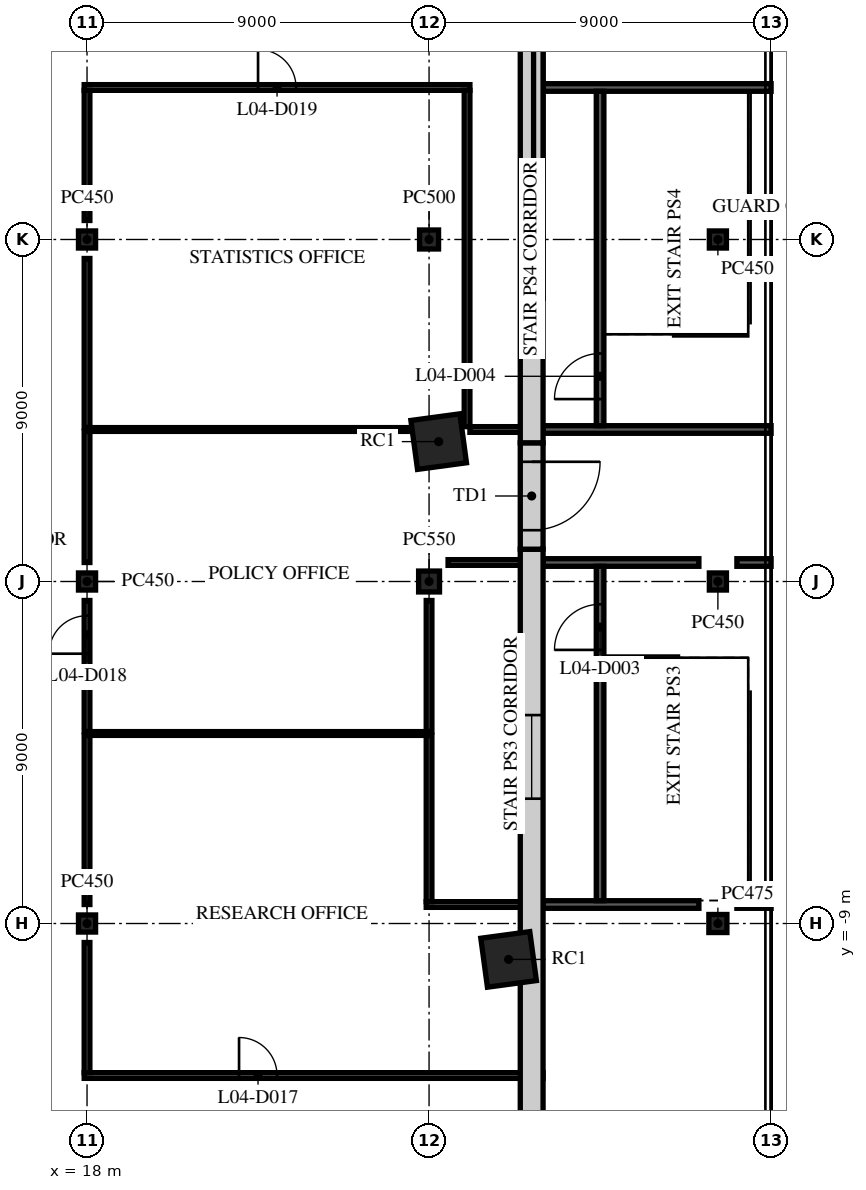
"""IFC4 building model, lengths in metres.
Left out: names, types, materials, properties, quantities, classifications, styles, units other than length and angle.
Written with IfcOpenShell. Run it as: python <this file> out.ifc"""

import sys

from ifc_helpers import new_model, si_unit, direction, frame, frame_2d, origin, origin_2d, place, context, subcontext, project, spatial, rectangle, extrude, element, fill, save


model = new_model("IFC4")
c1 = context("Model", 3, precision=1e-05, world=origin(), true_north=direction((0.0, 1.0)))
c2 = subcontext(c1, "Body", "Model", "MODEL_VIEW")
j1 = project(units=[si_unit("LENGTHUNIT", "METRE"), si_unit("PLANEANGLEUNIT", "RADIAN")], contexts=[c1])
p1 = place(None, origin())
s1 = spatial("IfcSite", under=j1, at=p1, CompositionType="ELEMENT")
p2 = place(p1, origin())
s2 = spatial("IfcBuilding", under=s1, at=p2, CompositionType="ELEMENT")
p3 = place(p2, frame((0.0, 0.0, 18.0)))
s3 = spatial("IfcBuildingStorey", under=s2, at=p3, CompositionType="ELEMENT", Elevation=18.0)
for number, where, z_axis, x_axis in (
    (1, (18.0, -9.0, 0.0), (0.0, 0.0, 1.0), (1.0, 0.0, 0.0)),
    (2, (18.0, 0.0, 0.0), (0.0, 0.0, 1.0), (1.0, 0.0, 0.0)),
    (3, (18.0, 9.0, 0.0), (0.0, 0.0, 1.0), (1.0, 0.0, 0.0)),
):
    element("IfcColumn", number, at=place(p3, frame(where, z_axis=z_axis, x_axis=x_axis)), inside=s3, PredefinedType="COLUMN", context=c2, shape_type="SweptSolid", body=[
        extrude(rectangle(XDim=0.45, YDim=0.45, at=origin_2d()), origin(), (0.0, 0.0, 1.0), 4.5),
    ])
p4 = place(p3, frame((27.0, 0.0, 0.0), z_axis=(0.0, 0.0, 1.0), x_axis=(1.0, 0.0, 0.0)))
e4 = element("IfcColumn", 4, at=p4, inside=s3, PredefinedType="COLUMN", context=c2, shape_type="SweptSolid", body=[
    extrude(rectangle(XDim=0.55, YDim=0.55, at=origin_2d()), origin(), (0.0, 0.0, 1.0), 4.5),
])
p5 = place(p3, frame((27.0, 9.0, 0.0), z_axis=(0.0, 0.0, 1.0), x_axis=(1.0, 0.0, 0.0)))
e5 = element("IfcColumn", 5, at=p5, inside=s3, PredefinedType="COLUMN", context=c2, shape_type="SweptSolid", body=[
    extrude(rectangle(XDim=0.5, YDim=0.5, at=origin_2d()), origin(), (0.0, 0.0, 1.0), 4.5),
])
p6 = place(p3, frame((34.6, -9.0, 0.0), z_axis=(0.0, 0.0, 1.0), x_axis=(1.0, 0.0, 0.0)))
e6 = element("IfcColumn", 6, at=p6, inside=s3, PredefinedType="COLUMN", context=c2, shape_type="SweptSolid", body=[
    extrude(rectangle(XDim=0.475, YDim=0.475, at=origin_2d()), origin(), (0.0, 0.0, 1.0), 4.5),
])
for number, where, z_axis, x_axis in (
    (7, (34.6, 0.0, 0.0), (0.0, 0.0, 1.0), (1.0, 0.0, 0.0)),
    (8, (34.6, 9.0, 0.0), (0.0, 0.0, 1.0), (1.0, 0.0, 0.0)),
):
    element("IfcColumn", number, at=place(p3, frame(where, z_axis=z_axis, x_axis=x_axis)), inside=s3, PredefinedType="COLUMN", context=c2, shape_type="SweptSolid", body=[
        extrude(rectangle(XDim=0.45, YDim=0.45, at=origin_2d()), origin(), (0.0, 0.0, 1.0), 4.5),
    ])
for number, where, z_axis, x_axis in (
    (9, (29.093, -9.945, 0.0), (0.0, 0.0, 1.0), (0.991, 0.134, 0.0)),
    (10, (27.253, 3.681, 0.0), (0.0, 0.0, 1.0), (0.991, 0.134, 0.0)),
):
    element("IfcColumn", number, at=place(p3, frame(where, z_axis=z_axis, x_axis=x_axis)), inside=s3, PredefinedType="COLUMN", context=c2, shape_type="SweptSolid", body=[
        extrude(rectangle(XDim=1.3, YDim=1.3, at=origin_2d()), origin(), (0.0, 0.0, 1.0), 4.5),
    ])
p7 = place(p3, frame((17.925, -13.0, 0.0), z_axis=(0.0, 0.0, 1.0), x_axis=(1.0, 0.0, 0.0)))
e11 = element("IfcWall", 11, at=p7, inside=s3, PredefinedType="PARTITIONING", context=c2, shape_type="SweptSolid", body=[
    extrude(rectangle(XDim=12.075, YDim=0.15, at=frame_2d((6.038, 0.0))), origin(), (0.0, 0.0, 1.0), 3.23),
])
p8 = place(p7, frame((4.075, 0.0, 0.0)))
e12 = element("IfcOpeningElement", 12, at=p8, cuts=e11, PredefinedType="OPENING", context=c2, shape_type="SweptSolid", body=[
    extrude(rectangle(XDim=1.0, YDim=2.1, at=frame_2d((0.5, 1.05))), frame((0.0, 0.085, 0.0), z_axis=(0.0, -1.0, 0.0), x_axis=(1.0, 0.0, 0.0)), (0.0, 0.0, 1.0), 0.17),
])
p9 = place(p3, frame((26.925, -8.5, 0.0), z_axis=(0.0, 0.0, 1.0), x_axis=(1.0, 0.0, 0.0)))
e13 = element("IfcWall", 13, at=p9, inside=s3, PredefinedType="PARTITIONING", context=c2, shape_type="SweptSolid", body=[
    extrude(rectangle(XDim=3.075, YDim=0.15, at=frame_2d((1.538, 0.0))), origin(), (0.0, 0.0, 1.0), 3.23),
])
p10 = place(p3, frame((30.0, -8.5, 0.0), z_axis=(0.0, 0.0, 1.0), x_axis=(1.0, 0.0, 0.0)))
e14 = element("IfcWall", 14, at=p10, inside=s3, PredefinedType="PARTITIONING", context=c2, shape_type="SweptSolid", body=[
    extrude(rectangle(XDim=4.1, YDim=0.2, at=frame_2d((2.05, 0.0))), origin(), (0.0, 0.0, 1.0), 4.05),
])
p11 = place(p3, frame((35.1, -8.5, 0.0), z_axis=(0.0, 0.0, 1.0), x_axis=(1.0, 0.0, 0.0)))
e15 = element("IfcWall", 15, at=p11, inside=s3, PredefinedType="PARTITIONING", context=c2, shape_type="SweptSolid", body=[
    extrude(rectangle(XDim=0.9, YDim=0.2, at=frame_2d((0.45, 0.0))), origin(), (0.0, 0.0, 1.0), 4.05),
])
p12 = place(p3, frame((18.075, -4.0, 0.0), z_axis=(0.0, 0.0, 1.0), x_axis=(1.0, 0.0, 0.0)))
e16 = element("IfcWall", 16, at=p12, inside=s3, PredefinedType="PARTITIONING", context=c2, shape_type="SweptSolid", body=[
    extrude(rectangle(XDim=8.85, YDim=0.1, at=frame_2d((4.425, 0.0))), origin(), (0.0, 0.0, 1.0), 4.05),
])
p13 = place(p3, frame((27.5, 0.5, 0.0), z_axis=(0.0, 0.0, 1.0), x_axis=(1.0, 0.0, 0.0)))
e17 = element("IfcWall", 17, at=p13, inside=s3, PredefinedType="PARTITIONING", context=c2, shape_type="SweptSolid", body=[
    extrude(rectangle(XDim=2.5, YDim=0.15, at=frame_2d((1.25, 0.0))), origin(), (0.0, 0.0, 1.0), 3.23),
])
p14 = place(p3, frame((30.0, 0.5, 0.0), z_axis=(0.0, 0.0, 1.0), x_axis=(1.0, 0.0, 0.0)))
e18 = element("IfcWall", 18, at=p14, inside=s3, PredefinedType="PARTITIONING", context=c2, shape_type="SweptSolid", body=[
    extrude(rectangle(XDim=4.1, YDim=0.2, at=frame_2d((2.05, 0.0))), origin(), (0.0, 0.0, 1.0), 4.05),
])
p15 = place(p3, frame((35.1, 0.5, 0.0), z_axis=(0.0, 0.0, 1.0), x_axis=(1.0, 0.0, 0.0)))
e19 = element("IfcWall", 19, at=p15, inside=s3, PredefinedType="PARTITIONING", context=c2, shape_type="SweptSolid", body=[
    extrude(rectangle(XDim=0.9, YDim=0.2, at=frame_2d((0.45, 0.0))), origin(), (0.0, 0.0, 1.0), 4.05),
])
p16 = place(p3, frame((18.075, 4.0, 0.0), z_axis=(0.0, 0.0, 1.0), x_axis=(1.0, 0.0, 0.0)))
e20 = element("IfcWall", 20, at=p16, inside=s3, PredefinedType="PARTITIONING", context=c2, shape_type="SweptSolid", body=[
    extrude(rectangle(XDim=8.447, YDim=0.1, at=frame_2d((4.223, 0.0))), origin(), (0.0, 0.0, 1.0), 3.53),
])
p17 = place(p3, frame((28.075, 4.0, 0.0), z_axis=(0.0, 0.0, 1.0), x_axis=(1.0, 0.0, 0.0)))
e21 = element("IfcWall", 21, at=p17, inside=s3, PredefinedType="PARTITIONING", context=c2, shape_type="SweptSolid", body=[
    extrude(rectangle(XDim=1.925, YDim=0.15, at=frame_2d((0.962, 0.0))), origin(), (0.0, 0.0, 1.0), 4.05),
])
p18 = place(p3, frame((30.0, 4.0, 0.0), z_axis=(0.0, 0.0, 1.0), x_axis=(1.0, 0.0, 0.0)))
e22 = element("IfcWall", 22, at=p18, inside=s3, PredefinedType="PARTITIONING", context=c2, shape_type="SweptSolid", body=[
    extrude(rectangle(XDim=6.0, YDim=0.2, at=frame_2d((3.0, 0.0))), origin(), (0.0, 0.0, 1.0), 4.05),
])
p19 = place(p3, frame((17.925, 13.0, 0.0), z_axis=(0.0, 0.0, 1.0), x_axis=(1.0, 0.0, 0.0)))
e23 = element("IfcWall", 23, at=p19, inside=s3, PredefinedType="PARTITIONING", context=c2, shape_type="SweptSolid", body=[
    extrude(rectangle(XDim=10.15, YDim=0.15, at=frame_2d((5.075, 0.0))), origin(), (0.0, 0.0, 1.0), 3.23),
])
p20 = place(p19, frame((4.575, 0.0, 0.0)))
e24 = element("IfcOpeningElement", 24, at=p20, cuts=e23, PredefinedType="OPENING", context=c2, shape_type="SweptSolid", body=[
    extrude(rectangle(XDim=1.0, YDim=2.1, at=frame_2d((0.5, 1.05))), frame((0.0, 0.085, 0.0), z_axis=(0.0, -1.0, 0.0), x_axis=(1.0, 0.0, 0.0)), (0.0, 0.0, 1.0), 0.17),
])
p21 = place(p3, frame((30.0, 13.0, 0.0), z_axis=(0.0, 0.0, 1.0), x_axis=(1.0, 0.0, 0.0)))
e25 = element("IfcWall", 25, at=p21, inside=s3, PredefinedType="PARTITIONING", context=c2, shape_type="SweptSolid", body=[
    extrude(rectangle(XDim=6.0, YDim=0.2, at=frame_2d((3.0, 0.0))), origin(), (0.0, 0.0, 1.0), 4.05),
])
p22 = place(p3, frame((18.0, -12.925, 0.0), z_axis=(0.0, 0.0, 1.0), x_axis=(0.0, 1.0, 0.0)))
e26 = element("IfcWall", 26, at=p22, inside=s3, PredefinedType="PARTITIONING", context=c2, shape_type="SweptSolid", body=[
    extrude(rectangle(XDim=3.425, YDim=0.15, at=frame_2d((1.712, 0.0))), origin(), (0.0, 0.0, 1.0), 3.53),
])
p23 = place(p3, frame((18.0, -8.5, 0.0), z_axis=(0.0, 0.0, 1.0), x_axis=(0.0, 1.0, 0.0)))
e27 = element("IfcWall", 27, at=p23, inside=s3, PredefinedType="PARTITIONING", context=c2, shape_type="SweptSolid", body=[
    extrude(rectangle(XDim=4.45, YDim=0.15, at=frame_2d((2.225, 0.0))), origin(), (0.0, 0.0, 1.0), 4.05),
])
p24 = place(p3, frame((18.0, -3.95, 0.0), z_axis=(0.0, 0.0, 1.0), x_axis=(0.0, 1.0, 0.0)))
e28 = element("IfcWall", 28, at=p24, inside=s3, PredefinedType="PARTITIONING", context=c2, shape_type="SweptSolid", body=[
    extrude(rectangle(XDim=3.45, YDim=0.15, at=frame_2d((1.725, 0.0))), origin(), (0.0, 0.0, 1.0), 3.53),
])
p25 = place(p24, frame((2.05, 0.0, 0.0)))
e29 = element("IfcOpeningElement", 29, at=p25, cuts=e28, PredefinedType="OPENING", context=c2, shape_type="SweptSolid", body=[
    extrude(rectangle(XDim=1.0, YDim=2.1, at=frame_2d((0.5, 1.05))), frame((0.0, 0.085, 0.0), z_axis=(0.0, -1.0, 0.0), x_axis=(1.0, 0.0, 0.0)), (0.0, 0.0, 1.0), 0.17),
])
p26 = place(p3, frame((18.0, 0.5, 0.0), z_axis=(0.0, 0.0, 1.0), x_axis=(0.0, 1.0, 0.0)))
e30 = element("IfcWall", 30, at=p26, inside=s3, PredefinedType="PARTITIONING", context=c2, shape_type="SweptSolid", body=[
    extrude(rectangle(XDim=3.45, YDim=0.15, at=frame_2d((1.725, 0.0))), origin(), (0.0, 0.0, 1.0), 3.53),
])
p27 = place(p3, frame((18.0, 4.05, 0.0), z_axis=(0.0, 0.0, 1.0), x_axis=(0.0, 1.0, 0.0)))
e31 = element("IfcWall", 31, at=p27, inside=s3, PredefinedType="PARTITIONING", context=c2, shape_type="SweptSolid", body=[
    extrude(rectangle(XDim=4.45, YDim=0.15, at=frame_2d((2.225, 0.0))), origin(), (0.0, 0.0, 1.0), 4.05),
])
p28 = place(p3, frame((18.0, 9.5, 0.0), z_axis=(0.0, 0.0, 1.0), x_axis=(0.0, 1.0, 0.0)))
e32 = element("IfcWall", 32, at=p28, inside=s3, PredefinedType="PARTITIONING", context=c2, shape_type="SweptSolid", body=[
    extrude(rectangle(XDim=3.425, YDim=0.15, at=frame_2d((1.712, 0.0))), origin(), (0.0, 0.0, 1.0), 3.53),
])
p29 = place(p3, frame((27.0, -8.425, 0.0), z_axis=(0.0, 0.0, 1.0), x_axis=(0.0, 1.0, 0.0)))
e33 = element("IfcWall", 33, at=p29, inside=s3, PredefinedType="PARTITIONING", context=c2, shape_type="SweptSolid", body=[
    extrude(rectangle(XDim=4.375, YDim=0.15, at=frame_2d((2.188, 0.0))), origin(), (0.0, 0.0, 1.0), 4.05),
])
p30 = place(p3, frame((27.0, -3.95, 0.0), z_axis=(0.0, 0.0, 1.0), x_axis=(0.0, 1.0, 0.0)))
e34 = element("IfcWall", 34, at=p30, inside=s3, PredefinedType="PARTITIONING", context=c2, shape_type="SweptSolid", body=[
    extrude(rectangle(XDim=3.45, YDim=0.15, at=frame_2d((1.725, 0.0))), origin(), (0.0, 0.0, 1.0), 3.53),
])
p31 = place(p3, frame((28.0, 4.075, 0.0), z_axis=(0.0, 0.0, 1.0), x_axis=(0.0, 1.0, 0.0)))
e35 = element("IfcWall", 35, at=p31, inside=s3, PredefinedType="PARTITIONING", context=c2, shape_type="SweptSolid", body=[
    extrude(rectangle(XDim=8.85, YDim=0.15, at=frame_2d((4.425, 0.0))), origin(), (0.0, 0.0, 1.0), 4.05),
])
p32 = place(p3, frame((31.5, -8.4, 0.0), z_axis=(0.0, 0.0, 1.0), x_axis=(0.0, 1.0, 0.0)))
e36 = element("IfcWall", 36, at=p32, inside=s3, PredefinedType="PARTITIONING", context=c2, shape_type="SweptSolid", body=[
    extrude(rectangle(XDim=8.8, YDim=0.2, at=frame_2d((4.4, 0.0))), origin(), (0.0, 0.0, 1.0), 4.05),
])
p33 = place(p32, frame((6.6, 0.0, 0.0)))
e37 = element("IfcOpeningElement", 37, at=p33, cuts=e36, PredefinedType="OPENING", context=c2, shape_type="SweptSolid", body=[
    extrude(rectangle(XDim=1.2, YDim=2.1, at=frame_2d((0.6, 1.05))), frame((0.0, 0.11, 0.0), z_axis=(0.0, -1.0, 0.0), x_axis=(1.0, 0.0, 0.0)), (0.0, 0.0, 1.0), 0.22),
])
p34 = place(p3, frame((31.5, 4.1, 0.0), z_axis=(0.0, 0.0, 1.0), x_axis=(0.0, 1.0, 0.0)))
e38 = element("IfcWall", 38, at=p34, inside=s3, PredefinedType="PARTITIONING", context=c2, shape_type="SweptSolid", body=[
    extrude(rectangle(XDim=8.8, YDim=0.2, at=frame_2d((4.4, 0.0))), origin(), (0.0, 0.0, 1.0), 4.05),
])
p35 = place(p34, frame((0.7, 0.0, 0.0)))
e39 = element("IfcOpeningElement", 39, at=p35, cuts=e38, PredefinedType="OPENING", context=c2, shape_type="SweptSolid", body=[
    extrude(rectangle(XDim=1.2, YDim=2.1, at=frame_2d((0.6, 1.05))), frame((0.0, 0.11, 0.0), z_axis=(0.0, -1.0, 0.0), x_axis=(1.0, 0.0, 0.0)), (0.0, 0.0, 1.0), 0.22),
])
p36 = place(p3, frame((29.7, -29.4, 0.0), z_axis=(0.0, 0.0, 1.0), x_axis=(0.0, 1.0, 0.0)))
e40 = element("IfcWall", 40, at=p36, inside=s3, PredefinedType="STANDARD", context=c2, shape_type="SweptSolid", body=[
    extrude(rectangle(XDim=30.25, YDim=0.6, at=frame_2d((15.125, 0.0))), origin(), (0.0, 0.0, 1.0), 4.05),
])
p37 = place(p36, frame((0.908, 0.0, 0.9)))
e41 = element("IfcOpeningElement", 41, at=p37, cuts=e40, PredefinedType="OPENING", context=c2, shape_type="SweptSolid", body=[
    extrude(rectangle(XDim=2.2, YDim=3.0, at=frame_2d((1.1, 1.5))), frame((0.0, 0.31, 0.0), z_axis=(0.0, -1.0, 0.0), x_axis=(1.0, 0.0, 0.0)), (0.0, 0.0, 1.0), 0.62),
])
p38 = place(p36, frame((5.223, 0.0, 0.9)))
e42 = element("IfcOpeningElement", 42, at=p38, cuts=e40, PredefinedType="OPENING", context=c2, shape_type="SweptSolid", body=[
    extrude(rectangle(XDim=2.2, YDim=3.0, at=frame_2d((1.1, 1.5))), frame((0.0, 0.31, 0.0), z_axis=(0.0, -1.0, 0.0), x_axis=(1.0, 0.0, 0.0)), (0.0, 0.0, 1.0), 0.62),
])
p39 = place(p36, frame((23.685, 0.0, 0.9)))
e43 = element("IfcOpeningElement", 43, at=p39, cuts=e40, PredefinedType="OPENING", context=c2, shape_type="SweptSolid", body=[
    extrude(rectangle(XDim=2.2, YDim=3.0, at=frame_2d((1.1, 1.5))), frame((0.0, 0.31, 0.0), z_axis=(0.0, -1.0, 0.0), x_axis=(1.0, 0.0, 0.0)), (0.0, 0.0, 1.0), 0.62),
])
p40 = place(p3, frame((29.7, 3.65, 0.0), z_axis=(0.0, 0.0, 1.0), x_axis=(0.0, -1.0, 0.0)))
e44 = element("IfcWall", 44, at=p40, inside=s3, PredefinedType="STANDARD", context=c2, shape_type="SweptSolid", body=[
    extrude(rectangle(XDim=2.8, YDim=0.6, at=frame_2d((1.4, 0.0))), origin(), (0.0, 0.0, 1.0), 4.05),
])
p41 = place(p40, frame((0.5, 0.0, 0.0)))
e45 = element("IfcOpeningElement", 45, at=p41, cuts=e44, PredefinedType="OPENING", context=c2, shape_type="SweptSolid", body=[
    extrude(rectangle(XDim=1.8, YDim=2.4, at=frame_2d((0.9, 1.2))), frame((0.0, 0.31, 0.0), z_axis=(0.0, -1.0, 0.0), x_axis=(1.0, 0.0, 0.0)), (0.0, 0.0, 1.0), 0.62),
])
p42 = place(p3, frame((29.7, 3.65, 0.0), z_axis=(0.0, 0.0, 1.0), x_axis=(0.0, 1.0, 0.0)))
e46 = element("IfcWall", 46, at=p42, inside=s3, PredefinedType="STANDARD", context=c2, shape_type="SweptSolid", body=[
    extrude(rectangle(XDim=26.35, YDim=0.6, at=frame_2d((13.175, 0.0))), origin(), (0.0, 0.0, 1.0), 4.05),
])
p43 = place(p42, frame((4.481, 0.0, 0.9)))
e47 = element("IfcOpeningElement", 47, at=p43, cuts=e46, PredefinedType="OPENING", context=c2, shape_type="SweptSolid", body=[
    extrude(rectangle(XDim=2.2, YDim=3.0, at=frame_2d((1.1, 1.5))), frame((0.0, 0.31, 0.0), z_axis=(0.0, -1.0, 0.0), x_axis=(1.0, 0.0, 0.0)), (0.0, 0.0, 1.0), 0.62),
])
p44 = place(p42, frame((13.711, 0.0, 0.9)))
e48 = element("IfcOpeningElement", 48, at=p44, cuts=e46, PredefinedType="OPENING", context=c2, shape_type="SweptSolid", body=[
    extrude(rectangle(XDim=2.2, YDim=3.0, at=frame_2d((1.1, 1.5))), frame((0.0, 0.31, 0.0), z_axis=(0.0, -1.0, 0.0), x_axis=(1.0, 0.0, 0.0)), (0.0, 0.0, 1.0), 0.62),
])
p45 = place(p42, frame((22.942, 0.0, 0.9)))
e49 = element("IfcOpeningElement", 49, at=p45, cuts=e46, PredefinedType="OPENING", context=c2, shape_type="SweptSolid", body=[
    extrude(rectangle(XDim=2.2, YDim=3.0, at=frame_2d((1.1, 1.5))), frame((0.0, 0.31, 0.0), z_axis=(0.0, -1.0, 0.0), x_axis=(1.0, 0.0, 0.0)), (0.0, 0.0, 1.0), 0.62),
])
p46 = place(p3, frame((29.875, 7.453, 4.5), z_axis=(0.0, 0.0, 1.0), x_axis=(0.0, 1.0, 0.0)))
e50 = element("IfcWall", 50, at=p46, inside=s3, PredefinedType="PARAPET", context=c2, shape_type="SweptSolid", body=[
    extrude(rectangle(XDim=22.547, YDim=0.25, at=frame_2d((11.273, 0.0))), origin(), (0.0, 0.0, 1.0), 1.1),
])
p47 = place(p33, frame((1.2, 0.0, 0.0), z_axis=(0.0, 0.0, 1.0), x_axis=(-1.0, 0.0, 0.0)))
e51 = element("IfcDoor", 51, at=p47, inside=s3, OperationType="SINGLE_SWING_LEFT", PredefinedType="DOOR", context=c2, shape_type="SweptSolid", body=[
    extrude(rectangle(XDim=1.2, YDim=2.1, at=frame_2d((0.6, 1.05))), frame((0.0, 0.025, 0.0), z_axis=(0.0, -1.0, 0.0), x_axis=(1.0, 0.0, 0.0)), (0.0, 0.0, 1.0), 0.05),
])
fill(e37, e51)
p48 = place(p35, frame((1.2, 0.0, 0.0), z_axis=(0.0, 0.0, 1.0), x_axis=(-1.0, 0.0, 0.0)))
e52 = element("IfcDoor", 52, at=p48, inside=s3, OperationType="SINGLE_SWING_RIGHT", PredefinedType="DOOR", context=c2, shape_type="SweptSolid", body=[
    extrude(rectangle(XDim=1.2, YDim=2.1, at=frame_2d((0.6, 1.05))), frame((0.0, 0.025, 0.0), z_axis=(0.0, -1.0, 0.0), x_axis=(1.0, 0.0, 0.0)), (0.0, 0.0, 1.0), 0.05),
])
fill(e39, e52)
p49 = place(p8, origin())
e53 = element("IfcDoor", 53, at=p49, inside=s3, OperationType="SINGLE_SWING_LEFT", PredefinedType="DOOR", context=c2, shape_type="SweptSolid", body=[
    extrude(rectangle(XDim=1.0, YDim=2.1, at=frame_2d((0.5, 1.05))), frame((0.0, 0.025, 0.0), z_axis=(0.0, -1.0, 0.0), x_axis=(1.0, 0.0, 0.0)), (0.0, 0.0, 1.0), 0.05),
])
fill(e12, e53)
p50 = place(p25, origin())
e54 = element("IfcDoor", 54, at=p50, inside=s3, OperationType="SINGLE_SWING_RIGHT", PredefinedType="DOOR", context=c2, shape_type="SweptSolid", body=[
    extrude(rectangle(XDim=1.0, YDim=2.1, at=frame_2d((0.5, 1.05))), frame((0.0, 0.025, 0.0), z_axis=(0.0, -1.0, 0.0), x_axis=(1.0, 0.0, 0.0)), (0.0, 0.0, 1.0), 0.05),
])
fill(e29, e54)
p51 = place(p20, origin())
e55 = element("IfcDoor", 55, at=p51, inside=s3, OperationType="SINGLE_SWING_LEFT", PredefinedType="DOOR", context=c2, shape_type="SweptSolid", body=[
    extrude(rectangle(XDim=1.0, YDim=2.1, at=frame_2d((0.5, 1.05))), frame((0.0, 0.025, 0.0), z_axis=(0.0, -1.0, 0.0), x_axis=(1.0, 0.0, 0.0)), (0.0, 0.0, 1.0), 0.05),
])
fill(e24, e55)
p52 = place(p39, origin())
e56 = element("IfcWindow", 56, at=p52, inside=s3, PartitioningType="SINGLE_PANEL", PredefinedType="WINDOW", context=c2, shape_type="SweptSolid", body=[
    extrude(rectangle(XDim=2.2, YDim=3.0, at=frame_2d((1.1, 1.5))), frame((0.0, 0.03, 0.0), z_axis=(0.0, -1.0, 0.0), x_axis=(1.0, 0.0, 0.0)), (0.0, 0.0, 1.0), 0.06),
])
fill(e43, e56)
p53 = place(p41, origin())
e57 = element("IfcDoor", 57, at=p53, inside=s3, OperationType="DOUBLE_DOOR_SINGLE_SWING", PredefinedType="DOOR", context=c2, shape_type="SweptSolid", body=[
    extrude(rectangle(XDim=1.8, YDim=2.4, at=frame_2d((0.9, 1.2))), frame((0.0, 0.025, 0.0), z_axis=(0.0, -1.0, 0.0), x_axis=(1.0, 0.0, 0.0)), (0.0, 0.0, 1.0), 0.05),
])
fill(e45, e57)
p54 = place(p43, origin())
e58 = element("IfcWindow", 58, at=p54, inside=s3, PartitioningType="SINGLE_PANEL", PredefinedType="WINDOW", context=c2, shape_type="SweptSolid", body=[
    extrude(rectangle(XDim=2.2, YDim=3.0, at=frame_2d((1.1, 1.5))), frame((0.0, 0.03, 0.0), z_axis=(0.0, -1.0, 0.0), x_axis=(1.0, 0.0, 0.0)), (0.0, 0.0, 1.0), 0.06),
])
fill(e47, e58)
save(model, sys.argv[1])
